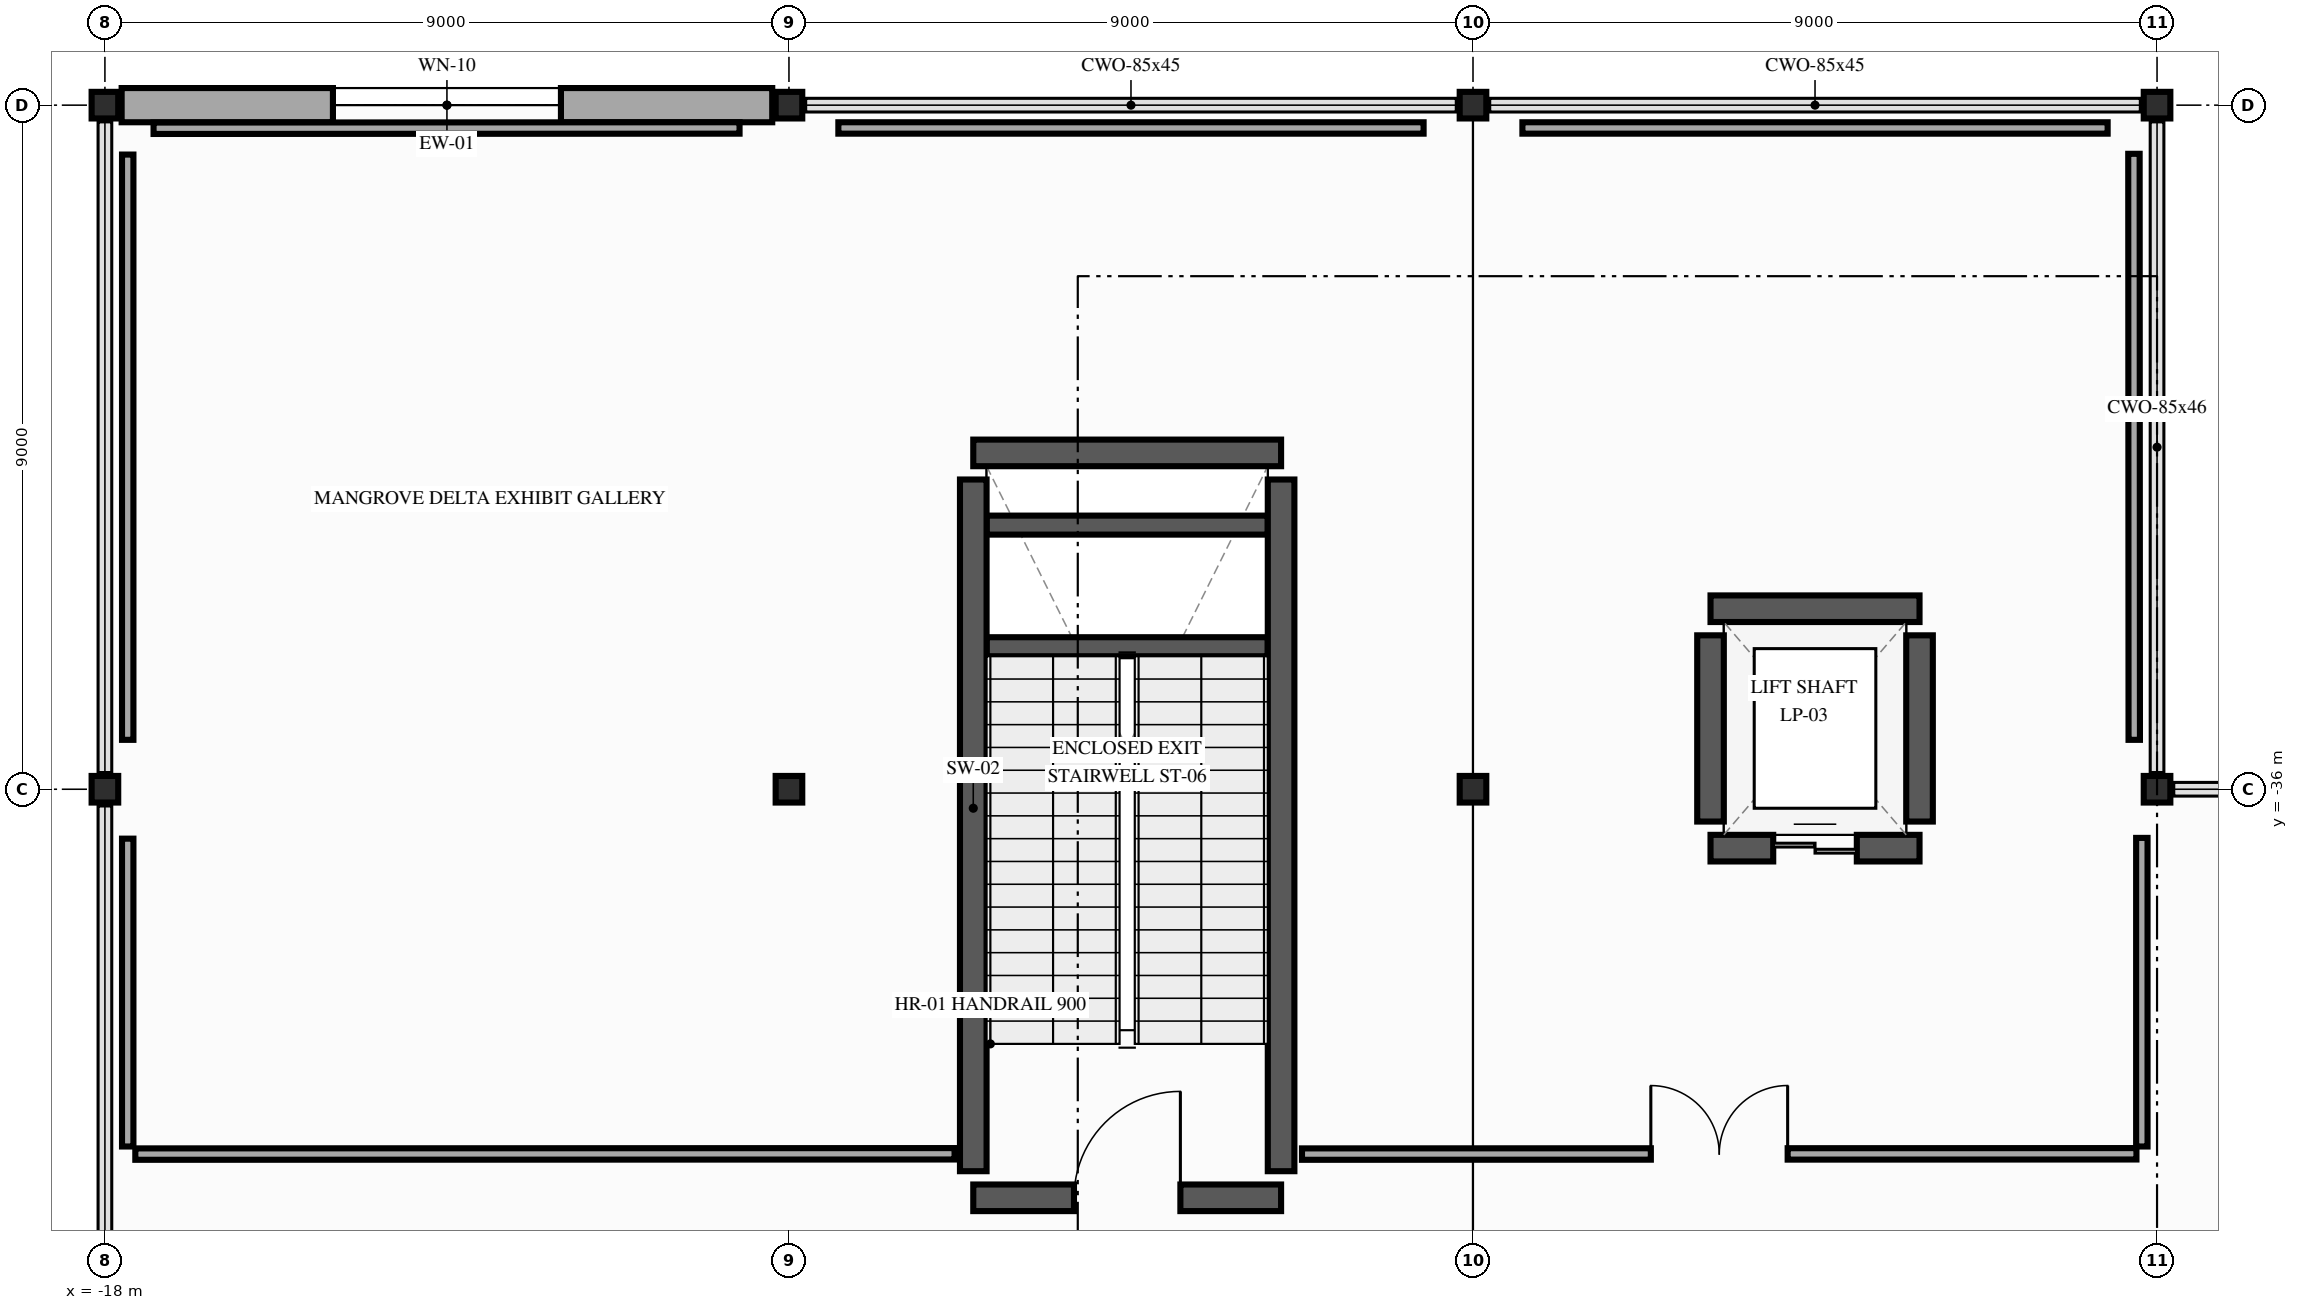
"""IFC4 building model, lengths in metres.
Left out: names, types, materials, properties, quantities, classifications, styles, units other than length and angle.
Written with IfcOpenShell. Run it as: python <this file> out.ifc"""

import sys

from ifc_helpers import new_model, si_unit, direction, frame, frame_2d, origin, origin_2d, place, context, subcontext, project, spatial, rectangle, i_section, extrude, element, fill, save


model = new_model("IFC4")
c1 = context("Model", 3, precision=1e-05, world=origin(), true_north=direction((0.0, 1.0)))
c2 = subcontext(c1, "Body", "Model", "MODEL_VIEW")
j1 = project(units=[si_unit("LENGTHUNIT", "METRE"), si_unit("PLANEANGLEUNIT", "RADIAN")], contexts=[c1])
p1 = place(None, origin())
s1 = spatial("IfcSite", under=j1, at=p1, CompositionType="ELEMENT")
p2 = place(p1, origin())
s2 = spatial("IfcBuilding", under=s1, at=p2, CompositionType="ELEMENT")
p3 = place(p2, frame((0.0, 0.0, 5.4)))
s3 = spatial("IfcBuildingStorey", under=s2, at=p3, CompositionType="ELEMENT", Elevation=5.4)
for number, where, z_axis, x_axis in (
    (1, (-18.0, -36.0, 0.0), (0.0, 0.0, 1.0), (1.0, 0.0, 0.0)),
    (2, (-18.0, -27.0, 0.0), (0.0, 0.0, 1.0), (1.0, 0.0, 0.0)),
    (3, (-9.0, -36.0, 0.0), (0.0, 0.0, 1.0), (1.0, 0.0, 0.0)),
    (4, (-9.0, -27.0, 0.0), (0.0, 0.0, 1.0), (1.0, 0.0, 0.0)),
    (5, (0.0, -36.0, 0.0), (0.0, 0.0, 1.0), (1.0, 0.0, 0.0)),
    (6, (0.0, -27.0, 0.0), (0.0, 0.0, 1.0), (1.0, 0.0, 0.0)),
    (7, (9.0, -36.0, 0.0), (0.0, 0.0, 1.0), (1.0, 0.0, 0.0)),
    (8, (9.0, -27.0, 0.0), (0.0, 0.0, 1.0), (1.0, 0.0, 0.0)),
):
    element("IfcColumn", number, at=place(p3, frame(where, z_axis=z_axis, x_axis=x_axis)), inside=s3, PredefinedType="COLUMN", context=c2, shape_type="SweptSolid", body=[
        extrude(i_section(OverallWidth=0.35, OverallDepth=0.35, WebThickness=0.012, FlangeThickness=0.019, FilletRadius=0.02, at=origin_2d()), origin(), (0.0, 0.0, 1.0), 5.4),
    ])
p4 = place(p3, frame((-17.78, -27.0, 0.0), z_axis=(0.0, 0.0, 1.0), x_axis=(1.0, 0.0, 0.0)))
e9 = element("IfcWall", 9, at=p4, inside=s3, PredefinedType="SOLIDWALL", context=c2, shape_type="SweptSolid", body=[
    extrude(rectangle(XDim=8.56, YDim=0.45, at=frame_2d((4.28, 0.0))), origin(), (0.0, 0.0, 1.0), 4.537),
])
p5 = place(p4, frame((2.78, 0.0, 0.9)))
e10 = element("IfcOpeningElement", 10, at=p5, cuts=e9, PredefinedType="OPENING", context=c2, shape_type="SweptSolid", body=[
    extrude(rectangle(XDim=3.0, YDim=2.0, at=frame_2d((1.5, 1.0))), frame((0.0, 0.235, 0.0), z_axis=(0.0, -1.0, 0.0), x_axis=(1.0, 0.0, 0.0)), (0.0, 0.0, 1.0), 0.47),
])
for number, where, z_axis, x_axis in (
    (11, (-6.4, -34.125, 0.0), (0.0, 0.0, 1.0), (1.0, 0.0, 0.0)),
    (12, (-6.4, -32.525, 0.0), (0.0, 0.0, 1.0), (1.0, 0.0, 0.0)),
):
    element("IfcWall", number, at=place(p3, frame(where, z_axis=z_axis, x_axis=x_axis)), inside=s3, PredefinedType="SHEAR", context=c2, shape_type="SweptSolid", body=[
        extrude(rectangle(XDim=3.7, YDim=0.25, at=frame_2d((1.85, 0.0))), origin(), (0.0, 0.0, 1.0), 2.5),
    ])
p6 = place(p3, frame((-6.575, -41.375, 0.0), z_axis=(0.0, 0.0, 1.0), x_axis=(1.0, 0.0, 0.0)))
e13 = element("IfcWall", 13, at=p6, inside=s3, PredefinedType="SHEAR", context=c2, shape_type="SweptSolid", body=[
    extrude(rectangle(XDim=4.05, YDim=0.35, at=frame_2d((2.025, 0.0))), origin(), (0.0, 0.0, 1.0), 5.15),
])
p7 = place(p6, frame((1.325, 0.0, 0.0)))
e14 = element("IfcOpeningElement", 14, at=p7, cuts=e13, PredefinedType="OPENING", context=c2, shape_type="SweptSolid", body=[
    extrude(rectangle(XDim=1.4, YDim=2.2, at=frame_2d((0.7, 1.1))), frame((0.0, 0.185, 0.0), z_axis=(0.0, -1.0, 0.0), x_axis=(1.0, 0.0, 0.0)), (0.0, 0.0, 1.0), 0.37),
])
p8 = place(p3, frame((-6.575, -31.575, 0.0), z_axis=(0.0, 0.0, 1.0), x_axis=(1.0, 0.0, 0.0)))
e15 = element("IfcWall", 15, at=p8, inside=s3, PredefinedType="SHEAR", context=c2, shape_type="SweptSolid", body=[
    extrude(rectangle(XDim=4.05, YDim=0.35, at=frame_2d((2.025, 0.0))), origin(), (0.0, 0.0, 1.0), 5.15),
])
for number, where, z_axis, x_axis in (
    (16, (-6.575, -41.025, 0.0), (0.0, 0.0, 1.0), (0.0, 1.0, 0.0)),
    (17, (-2.525, -41.025, 0.0), (0.0, 0.0, 1.0), (0.0, 1.0, 0.0)),
):
    element("IfcWall", number, at=place(p3, frame(where, z_axis=z_axis, x_axis=x_axis)), inside=s3, PredefinedType="SHEAR", context=c2, shape_type="SweptSolid", body=[
        extrude(rectangle(XDim=9.1, YDim=0.35, at=frame_2d((4.55, 0.0))), origin(), (0.0, 0.0, 1.0), 5.15),
    ])
p9 = place(p3, frame((3.125, -36.775, 0.0), z_axis=(0.0, 0.0, 1.0), x_axis=(1.0, 0.0, 0.0)))
e18 = element("IfcWall", 18, at=p9, inside=s3, PredefinedType="SHEAR", context=c2, shape_type="SweptSolid", body=[
    extrude(rectangle(XDim=2.75, YDim=0.35, at=frame_2d((1.375, 0.0))), origin(), (0.0, 0.0, 1.0), 5.15),
])
p10 = place(p9, frame((0.825, 0.0, 0.0)))
e19 = element("IfcOpeningElement", 19, at=p10, cuts=e18, PredefinedType="OPENING", context=c2, shape_type="SweptSolid", body=[
    extrude(rectangle(XDim=1.1, YDim=2.2, at=frame_2d((0.55, 1.1))), frame((0.0, 0.185, 0.0), z_axis=(0.0, -1.0, 0.0), x_axis=(1.0, 0.0, 0.0)), (0.0, 0.0, 1.0), 0.37),
])
p11 = place(p3, frame((5.875, -33.625, 0.0), z_axis=(0.0, 0.0, 1.0), x_axis=(-1.0, 0.0, 0.0)))
e20 = element("IfcWall", 20, at=p11, inside=s3, PredefinedType="SHEAR", context=c2, shape_type="SweptSolid", body=[
    extrude(rectangle(XDim=2.75, YDim=0.35, at=frame_2d((1.375, 0.0))), origin(), (0.0, 0.0, 1.0), 5.15),
])
for number, where, z_axis, x_axis in (
    (21, (3.125, -36.425, 0.0), (0.0, 0.0, 1.0), (0.0, 1.0, 0.0)),
    (22, (5.875, -36.425, 0.0), (0.0, 0.0, 1.0), (0.0, 1.0, 0.0)),
):
    element("IfcWall", number, at=place(p3, frame(where, z_axis=z_axis, x_axis=x_axis)), inside=s3, PredefinedType="SHEAR", context=c2, shape_type="SweptSolid", body=[
        extrude(rectangle(XDim=2.45, YDim=0.35, at=frame_2d((1.225, 0.0))), origin(), (0.0, 0.0, 1.0), 5.15),
    ])
p12 = place(p3, frame((-17.7, -36.65, 0.0), z_axis=(0.0, 0.0, 1.0), x_axis=(0.0, -1.0, 0.0)))
e23 = element("IfcWall", 23, at=p12, inside=s3, PredefinedType="PARTITIONING", context=c2, shape_type="SweptSolid", body=[
    extrude(rectangle(XDim=4.05, YDim=0.15, at=frame_2d((2.025, 0.0))), origin(), (0.0, 0.0, 1.0), 4.637),
])
p13 = place(p3, frame((-17.6, -40.8, 0.0), z_axis=(0.0, 0.0, 1.0), x_axis=(0.999999925871, 0.000385042213, 0.0)))
e24 = element("IfcWall", 24, at=p13, inside=s3, PredefinedType="PARTITIONING", context=c2, shape_type="SweptSolid", body=[
    extrude(rectangle(XDim=10.779, YDim=0.15, at=frame_2d((5.39, 0.0))), origin(), (0.0, 0.0, 1.0), 4.637),
])
p14 = place(p3, frame((-2.25, -40.8, 0.0), z_axis=(0.0, 0.0, 1.0), x_axis=(0.999999928547, 0.000378029771, 0.0)))
e25 = element("IfcWall", 25, at=p14, inside=s3, PredefinedType="PARTITIONING", context=c2, shape_type="SweptSolid", body=[
    extrude(rectangle(XDim=10.979, YDim=0.15, at=frame_2d((5.49, 0.0))), origin(), (0.0, 0.0, 1.0), 4.637),
])
p15 = place(p14, frame((4.59, 0.0, 0.0)))
e26 = element("IfcOpeningElement", 26, at=p15, cuts=e25, PredefinedType="OPENING", context=c2, shape_type="SweptSolid", body=[
    extrude(rectangle(XDim=1.8, YDim=2.3, at=frame_2d((0.9, 1.15))), frame((0.0, 0.085, 0.0), z_axis=(0.0, -1.0, 0.0), x_axis=(1.0, 0.0, 0.0)), (0.0, 0.0, 1.0), 0.17),
])
p16 = place(p3, frame((8.8, -40.7, 0.0), z_axis=(0.0, 0.0, 1.0), x_axis=(0.0, 1.0, 0.0)))
e27 = element("IfcWall", 27, at=p16, inside=s3, PredefinedType="PARTITIONING", context=c2, shape_type="SweptSolid", body=[
    extrude(rectangle(XDim=4.06, YDim=0.15, at=frame_2d((2.03, 0.0))), origin(), (0.0, 0.0, 1.0), 4.637),
])
p17 = place(p3, frame((8.7, -35.35, 0.0), z_axis=(0.0, 0.0, 1.0), x_axis=(-0.00050663367, 0.999999871661, 0.0)))
e28 = element("IfcWall", 28, at=p17, inside=s3, PredefinedType="PARTITIONING", context=c2, shape_type="SweptSolid", body=[
    extrude(rectangle(XDim=7.71, YDim=0.15, at=frame_2d((3.855, 0.0))), origin(), (0.0, 0.0, 1.0), 4.637),
])
for number, where, z_axis, x_axis in (
    (29, (8.35, -27.3, 0.0), (0.0, 0.0, 1.0), (-1.0, 0.0, 0.0)),
    (30, (-0.65, -27.3, 0.0), (0.0, 0.0, 1.0), (-1.0, 0.0, 0.0)),
):
    element("IfcWall", number, at=place(p3, frame(where, z_axis=z_axis, x_axis=x_axis)), inside=s3, PredefinedType="PARTITIONING", context=c2, shape_type="SweptSolid", body=[
        extrude(rectangle(XDim=7.7, YDim=0.15, at=frame_2d((3.85, 0.0))), origin(), (0.0, 0.0, 1.0), 4.537),
    ])
p18 = place(p3, frame((-9.65, -27.3, 0.0), z_axis=(0.0, 0.0, 1.0), x_axis=(-0.999999871661, -0.00050663367, 0.0)))
e31 = element("IfcWall", 31, at=p18, inside=s3, PredefinedType="PARTITIONING", context=c2, shape_type="SweptSolid", body=[
    extrude(rectangle(XDim=7.71, YDim=0.15, at=frame_2d((3.855, 0.0))), origin(), (0.0, 0.0, 1.0), 4.537),
])
p19 = place(p3, frame((-17.7, -27.65, 0.0), z_axis=(0.0, 0.0, 1.0), x_axis=(0.0, -1.0, 0.0)))
e32 = element("IfcWall", 32, at=p19, inside=s3, PredefinedType="PARTITIONING", context=c2, shape_type="SweptSolid", body=[
    extrude(rectangle(XDim=7.7, YDim=0.15, at=frame_2d((3.85, 0.0))), origin(), (0.0, 0.0, 1.0), 4.637),
])
p20 = place(p5, origin())
e33 = element("IfcWindow", 33, at=p20, inside=s3, PartitioningType="SINGLE_PANEL", PredefinedType="WINDOW", context=c2, shape_type="SweptSolid", body=[
    extrude(rectangle(XDim=3.0, YDim=2.0, at=frame_2d((1.5, 1.0))), frame((0.0, 0.03, 0.0), z_axis=(0.0, -1.0, 0.0), x_axis=(1.0, 0.0, 0.0)), (0.0, 0.0, 1.0), 0.06),
])
fill(e10, e33)
p21 = place(p7, origin())
e34 = element("IfcDoor", 34, at=p21, inside=s3, OperationType="SINGLE_SWING_RIGHT", PredefinedType="DOOR", context=c2, shape_type="SweptSolid", body=[
    extrude(rectangle(XDim=1.4, YDim=2.2, at=frame_2d((0.7, 1.1))), frame((0.0, 0.025, 0.0), z_axis=(0.0, -1.0, 0.0), x_axis=(1.0, 0.0, 0.0)), (0.0, 0.0, 1.0), 0.05),
])
fill(e14, e34)
p22 = place(p10, origin())
e35 = element("IfcDoor", 35, at=p22, inside=s3, OperationType="DOUBLE_DOOR_SLIDING", PredefinedType="DOOR", context=c2, shape_type="SweptSolid", body=[
    extrude(rectangle(XDim=1.1, YDim=2.2, at=frame_2d((0.55, 1.1))), frame((0.0, 0.025, 0.0), z_axis=(0.0, -1.0, 0.0), x_axis=(1.0, 0.0, 0.0)), (0.0, 0.0, 1.0), 0.05),
])
fill(e19, e35)
p23 = place(p15, origin())
e36 = element("IfcDoor", 36, at=p23, inside=s3, OperationType="DOUBLE_DOOR_SINGLE_SWING", PredefinedType="DOOR", context=c2, shape_type="SweptSolid", body=[
    extrude(rectangle(XDim=1.8, YDim=2.3, at=frame_2d((0.9, 1.15))), frame((0.0, 0.025, 0.0), z_axis=(0.0, -1.0, 0.0), x_axis=(1.0, 0.0, 0.0)), (0.0, 0.0, 1.0), 0.05),
])
fill(e26, e36)
save(model, sys.argv[1])
